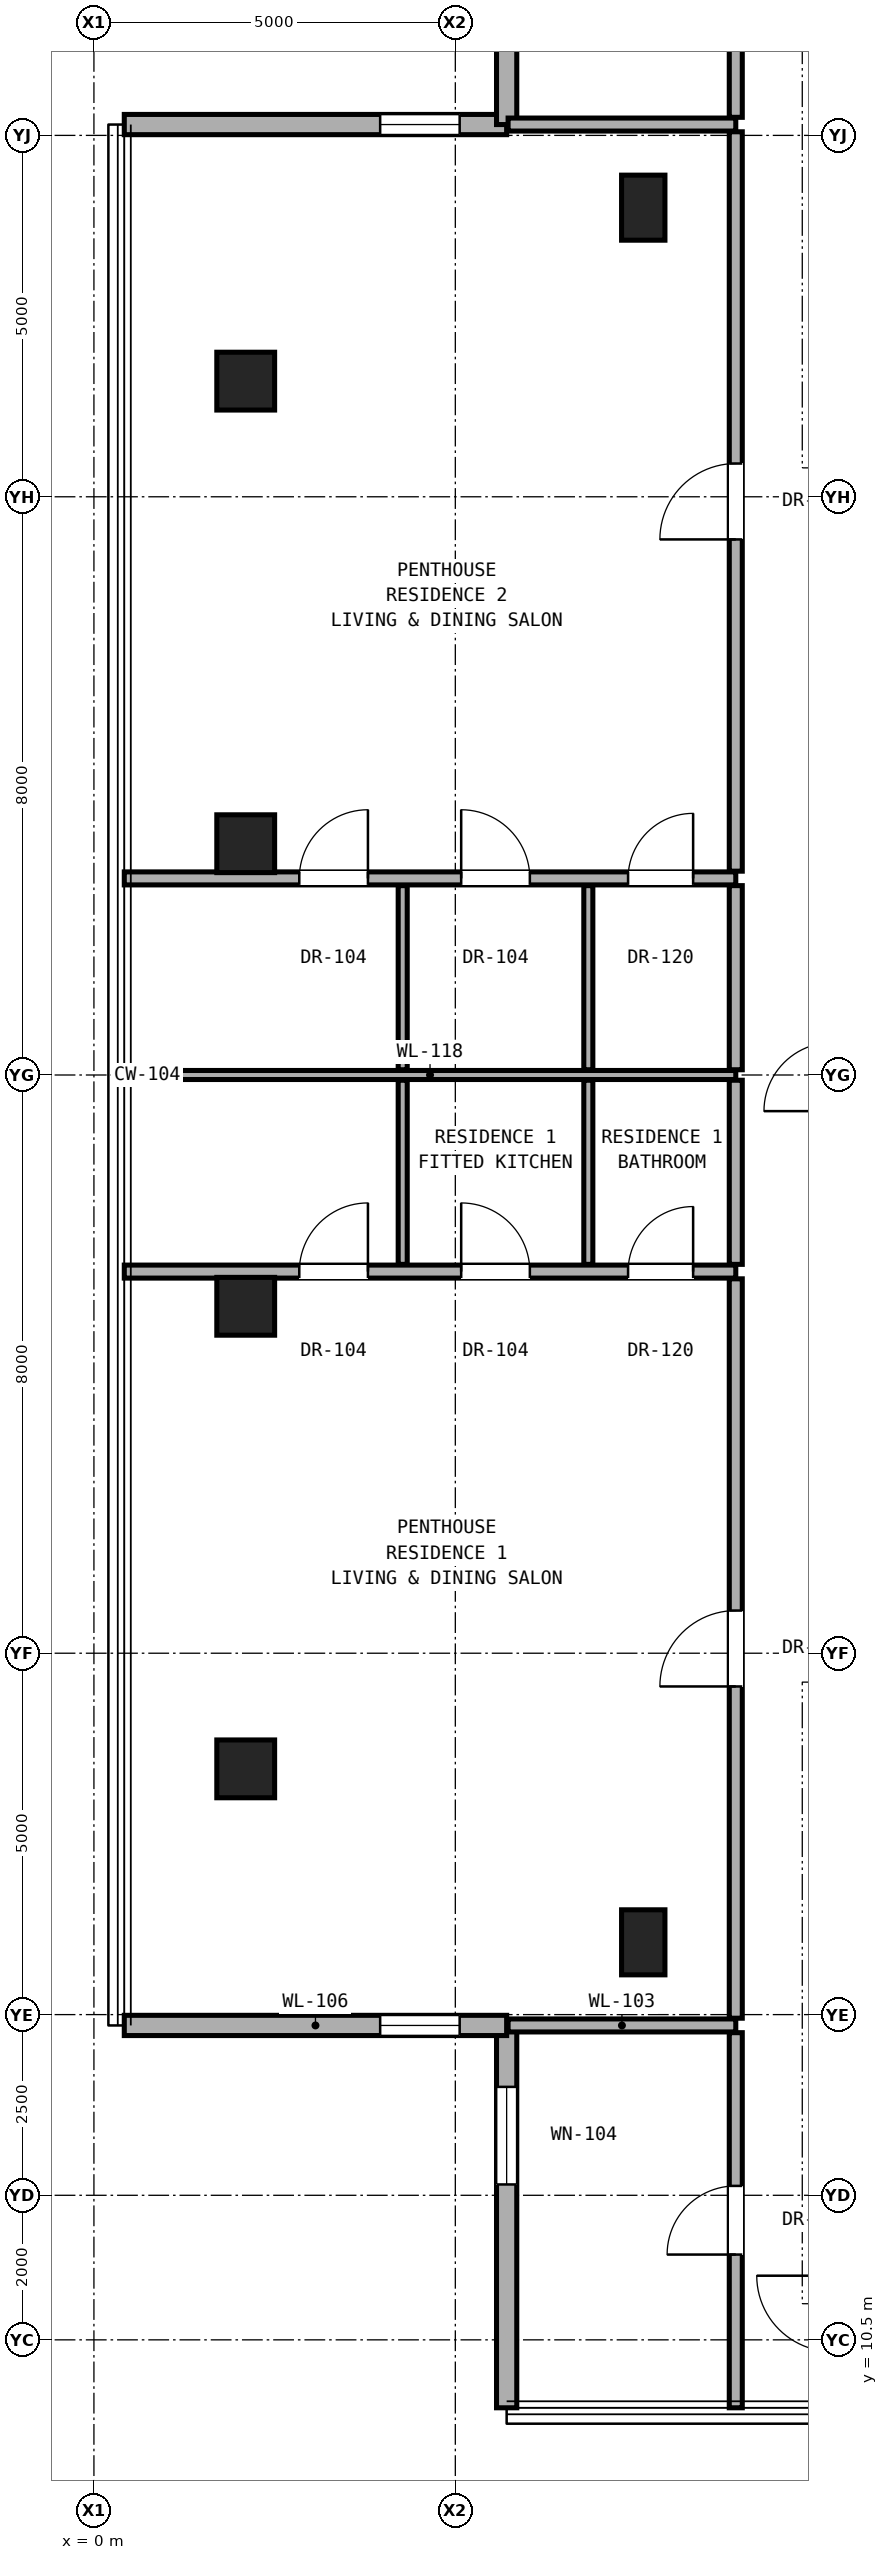
"""IFC4 building model, lengths in metres.
Left out: names, types, materials, properties, quantities, classifications, styles, units other than length and angle.
Written with IfcOpenShell. Run it as: python <this file> out.ifc"""

import sys

from ifc_helpers import new_model, si_unit, direction, frame, frame_2d, origin, origin_2d, place, context, subcontext, project, spatial, rectangle, hollow_rectangle, extrude, element, fill, save


model = new_model("IFC4")
c1 = context("Model", 3, precision=1e-05, world=origin(), true_north=direction((0.0, 1.0)))
c2 = subcontext(c1, "Body", "Model", "MODEL_VIEW")
j1 = project(units=[si_unit("LENGTHUNIT", "METRE"), si_unit("PLANEANGLEUNIT", "RADIAN")], contexts=[c1])
p1 = place(None, origin())
s1 = spatial("IfcSite", under=j1, at=p1, CompositionType="ELEMENT")
p2 = place(p1, origin())
s2 = spatial("IfcBuilding", under=s1, at=p2, CompositionType="ELEMENT")
p3 = place(p2, frame((0.0, 0.0, 219.4)))
s3 = spatial("IfcBuildingStorey", under=s2, at=p3, CompositionType="ELEMENT", Elevation=219.4)
for number, where, z_axis, x_axis in (
    (1, (2.1, 18.4, 0.0), (0.0, 0.0, 1.0), (1.0, 0.0, 0.0)),
    (2, (2.1, 24.8, 0.0), (0.0, 0.0, 1.0), (1.0, 0.0, 0.0)),
    (3, (2.1, 31.2, 0.0), (0.0, 0.0, 1.0), (1.0, 0.0, 0.0)),
    (4, (2.1, 37.6, 0.0), (0.0, 0.0, 1.0), (1.0, 0.0, 0.0)),
):
    element("IfcColumn", number, at=place(p3, frame(where, z_axis=z_axis, x_axis=x_axis)), inside=s3, PredefinedType="COLUMN", context=c2, shape_type="SweptSolid", body=[
        extrude(hollow_rectangle(XDim=0.8, YDim=0.8, WallThickness=0.045, at=origin_2d()), origin(), (0.0, 0.0, 1.0), 3.3),
    ])
for number, where, z_axis, x_axis in (
    (5, (7.6, 16.0, 0.0), (0.0, 0.0, 1.0), (1.0, 0.0, 0.0)),
    (6, (7.6, 40.0, 0.0), (0.0, 0.0, 1.0), (1.0, 0.0, 0.0)),
):
    element("IfcColumn", number, at=place(p3, frame(where, z_axis=z_axis, x_axis=x_axis)), inside=s3, PredefinedType="PILASTER", context=c2, shape_type="SweptSolid", body=[
        extrude(rectangle(XDim=0.6, YDim=0.9, at=origin_2d()), origin(), (0.0, 0.0, 1.0), 3.3),
    ])
p4 = place(p3, frame((5.71, 14.85, 0.0), z_axis=(0.0, 0.0, 1.0), x_axis=(0.0, -1.0, 0.0)))
e7 = element("IfcWall", 7, at=p4, inside=s3, PredefinedType="SOLIDWALL", context=c2, shape_type="SweptSolid", body=[
    extrude(rectangle(XDim=5.29, YDim=0.28, at=frame_2d((2.645, 0.0))), origin(), (0.0, 0.0, 1.0), 3.08),
])
p5 = place(p4, frame((0.85, 0.0, 0.73)))
e8 = element("IfcOpeningElement", 8, at=p5, cuts=e7, PredefinedType="OPENING", context=c2, shape_type="SweptSolid", body=[
    extrude(rectangle(XDim=1.35, YDim=2.2, at=frame_2d((0.675, 1.1))), frame((0.0, 0.15, 0.0), z_axis=(0.0, -1.0, 0.0), x_axis=(1.0, 0.0, 0.0)), (0.0, 0.0, 1.0), 0.3),
])
p6 = place(p3, frame((0.42, 14.85, 0.0), z_axis=(0.0, 0.0, 1.0), x_axis=(1.0, 0.0, 0.0)))
e9 = element("IfcWall", 9, at=p6, inside=s3, PredefinedType="SOLIDWALL", context=c2, shape_type="SweptSolid", body=[
    extrude(rectangle(XDim=5.29, YDim=0.28, at=frame_2d((2.645, 0.0))), origin(), (0.0, 0.0, 1.0), 3.08),
])
p7 = place(p6, frame((3.54, 0.0, 0.85)))
e10 = element("IfcOpeningElement", 10, at=p7, cuts=e9, PredefinedType="OPENING", context=c2, shape_type="SweptSolid", body=[
    extrude(rectangle(XDim=1.1, YDim=2.0, at=frame_2d((0.55, 1.0))), frame((0.0, 0.15, 0.0), z_axis=(0.0, -1.0, 0.0), x_axis=(1.0, 0.0, 0.0)), (0.0, 0.0, 1.0), 0.3),
])
p8 = place(p3, frame((5.71, 41.15, 0.0), z_axis=(0.0, 0.0, 1.0), x_axis=(-1.0, 0.0, 0.0)))
e11 = element("IfcWall", 11, at=p8, inside=s3, PredefinedType="SOLIDWALL", context=c2, shape_type="SweptSolid", body=[
    extrude(rectangle(XDim=5.29, YDim=0.28, at=frame_2d((2.645, 0.0))), origin(), (0.0, 0.0, 1.0), 3.08),
])
p9 = place(p8, frame((0.65, 0.0, 0.85)))
e12 = element("IfcOpeningElement", 12, at=p9, cuts=e11, PredefinedType="OPENING", context=c2, shape_type="SweptSolid", body=[
    extrude(rectangle(XDim=1.1, YDim=2.0, at=frame_2d((0.55, 1.0))), frame((0.0, 0.15, 0.0), z_axis=(0.0, -1.0, 0.0), x_axis=(1.0, 0.0, 0.0)), (0.0, 0.0, 1.0), 0.3),
])
p10 = place(p3, frame((5.71, 46.44, 0.0), z_axis=(0.0, 0.0, 1.0), x_axis=(0.0, -1.0, 0.0)))
e13 = element("IfcWall", 13, at=p10, inside=s3, PredefinedType="SOLIDWALL", context=c2, shape_type="SweptSolid", body=[
    extrude(rectangle(XDim=5.29, YDim=0.28, at=frame_2d((2.645, 0.0))), origin(), (0.0, 0.0, 1.0), 3.08),
])
p11 = place(p3, frame((5.73, 14.85, 0.0), z_axis=(0.0, 0.0, 1.0), x_axis=(1.0, 0.0, 0.0)))
e14 = element("IfcWall", 14, at=p11, inside=s3, PredefinedType="PARTITIONING", context=c2, shape_type="SweptSolid", body=[
    extrude(rectangle(XDim=3.15, YDim=0.18, at=frame_2d((1.575, 0.0))), origin(), (0.0, 0.0, 1.0), 3.1),
])
p12 = place(p3, frame((0.42, 25.28, 0.0), z_axis=(0.0, 0.0, 1.0), x_axis=(1.0, 0.0, 0.0)))
e15 = element("IfcWall", 15, at=p12, inside=s3, PredefinedType="PARTITIONING", context=c2, shape_type="SweptSolid", body=[
    extrude(rectangle(XDim=8.46, YDim=0.18, at=frame_2d((4.23, 0.0))), origin(), (0.0, 0.0, 1.0), 2.319),
])
p13 = place(p12, frame((2.421, 0.0, 0.0)))
e16 = element("IfcOpeningElement", 16, at=p13, cuts=e15, PredefinedType="OPENING", context=c2, shape_type="SweptSolid", body=[
    extrude(rectangle(XDim=0.95, YDim=2.15, at=frame_2d((0.475, 1.075))), frame((0.0, 0.1, 0.0), z_axis=(0.0, -1.0, 0.0), x_axis=(1.0, 0.0, 0.0)), (0.0, 0.0, 1.0), 0.2),
])
p14 = place(p12, frame((4.661, 0.0, 0.0)))
e17 = element("IfcOpeningElement", 17, at=p14, cuts=e15, PredefinedType="OPENING", context=c2, shape_type="SweptSolid", body=[
    extrude(rectangle(XDim=0.95, YDim=2.15, at=frame_2d((0.475, 1.075))), frame((0.0, 0.1, 0.0), z_axis=(0.0, -1.0, 0.0), x_axis=(1.0, 0.0, 0.0)), (0.0, 0.0, 1.0), 0.2),
])
p15 = place(p12, frame((6.97, 0.0, 0.0)))
e18 = element("IfcOpeningElement", 18, at=p15, cuts=e15, PredefinedType="OPENING", context=c2, shape_type="SweptSolid", body=[
    extrude(rectangle(XDim=0.9, YDim=2.1, at=frame_2d((0.45, 1.05))), frame((0.0, 0.1, 0.0), z_axis=(0.0, -1.0, 0.0), x_axis=(1.0, 0.0, 0.0)), (0.0, 0.0, 1.0), 0.2),
])
p16 = place(p3, frame((0.42, 28.0, 0.0), z_axis=(0.0, 0.0, 1.0), x_axis=(1.0, 0.0, 0.0)))
e19 = element("IfcWall", 19, at=p16, inside=s3, PredefinedType="PARTITIONING", context=c2, shape_type="SweptSolid", body=[
    extrude(rectangle(XDim=8.46, YDim=0.125, at=frame_2d((4.23, 0.0))), origin(), (0.0, 0.0, 1.0), 2.319),
])
p17 = place(p3, frame((0.42, 30.72, 0.0), z_axis=(0.0, 0.0, 1.0), x_axis=(1.0, 0.0, 0.0)))
e20 = element("IfcWall", 20, at=p17, inside=s3, PredefinedType="PARTITIONING", context=c2, shape_type="SweptSolid", body=[
    extrude(rectangle(XDim=8.46, YDim=0.18, at=frame_2d((4.23, 0.0))), origin(), (0.0, 0.0, 1.0), 2.319),
])
p18 = place(p17, frame((2.421, 0.0, 0.0)))
e21 = element("IfcOpeningElement", 21, at=p18, cuts=e20, PredefinedType="OPENING", context=c2, shape_type="SweptSolid", body=[
    extrude(rectangle(XDim=0.95, YDim=2.15, at=frame_2d((0.475, 1.075))), frame((0.0, 0.1, 0.0), z_axis=(0.0, -1.0, 0.0), x_axis=(1.0, 0.0, 0.0)), (0.0, 0.0, 1.0), 0.2),
])
p19 = place(p17, frame((4.661, 0.0, 0.0)))
e22 = element("IfcOpeningElement", 22, at=p19, cuts=e20, PredefinedType="OPENING", context=c2, shape_type="SweptSolid", body=[
    extrude(rectangle(XDim=0.95, YDim=2.15, at=frame_2d((0.475, 1.075))), frame((0.0, 0.1, 0.0), z_axis=(0.0, -1.0, 0.0), x_axis=(1.0, 0.0, 0.0)), (0.0, 0.0, 1.0), 0.2),
])
p20 = place(p17, frame((6.97, 0.0, 0.0)))
e23 = element("IfcOpeningElement", 23, at=p20, cuts=e20, PredefinedType="OPENING", context=c2, shape_type="SweptSolid", body=[
    extrude(rectangle(XDim=0.9, YDim=2.1, at=frame_2d((0.45, 1.05))), frame((0.0, 0.1, 0.0), z_axis=(0.0, -1.0, 0.0), x_axis=(1.0, 0.0, 0.0)), (0.0, 0.0, 1.0), 0.2),
])
p21 = place(p3, frame((5.73, 41.15, 0.0), z_axis=(0.0, 0.0, 1.0), x_axis=(1.0, 0.0, 0.0)))
e24 = element("IfcWall", 24, at=p21, inside=s3, PredefinedType="PARTITIONING", context=c2, shape_type="SweptSolid", body=[
    extrude(rectangle(XDim=3.15, YDim=0.18, at=frame_2d((1.575, 0.0))), origin(), (0.0, 0.0, 1.0), 3.1),
])
for number, where, z_axis, x_axis in (
    (25, (4.272, 25.38, 0.0), (0.0, 0.0, 1.0), (0.0, 1.0, 0.0)),
    (26, (4.272, 28.073, 0.0), (0.0, 0.0, 1.0), (0.0, 1.0, 0.0)),
    (27, (6.84, 25.38, 0.0), (0.0, 0.0, 1.0), (0.0, 1.0, 0.0)),
    (28, (6.84, 28.073, 0.0), (0.0, 0.0, 1.0), (0.0, 1.0, 0.0)),
):
    element("IfcWall", number, at=place(p3, frame(where, z_axis=z_axis, x_axis=x_axis)), inside=s3, PredefinedType="PARTITIONING", context=c2, shape_type="SweptSolid", body=[
        extrude(rectangle(XDim=2.548, YDim=0.125, at=frame_2d((1.274, 0.0))), origin(), (0.0, 0.0, 1.0), 3.1),
    ])
p22 = place(p3, frame((8.88, 9.56, 0.0), z_axis=(0.0, 0.0, 1.0), x_axis=(0.0, 1.0, 0.0)))
e29 = element("IfcWall", 29, at=p22, inside=s3, PredefinedType="PARTITIONING", context=c2, shape_type="SweptSolid", body=[
    extrude(rectangle(XDim=5.19, YDim=0.18, at=frame_2d((2.595, 0.0))), origin(), (0.0, 0.0, 1.0), 3.1),
])
p23 = place(p22, frame((2.12, 0.0, 0.0)))
e30 = element("IfcOpeningElement", 30, at=p23, cuts=e29, PredefinedType="OPENING", context=c2, shape_type="SweptSolid", body=[
    extrude(rectangle(XDim=0.95, YDim=2.15, at=frame_2d((0.475, 1.075))), frame((0.0, 0.1, 0.0), z_axis=(0.0, -1.0, 0.0), x_axis=(1.0, 0.0, 0.0)), (0.0, 0.0, 1.0), 0.2),
])
p24 = place(p3, frame((8.88, 14.95, 0.0), z_axis=(0.0, 0.0, 1.0), x_axis=(0.0, 1.0, 0.0)))
e31 = element("IfcWall", 31, at=p24, inside=s3, PredefinedType="PARTITIONING", context=c2, shape_type="SweptSolid", body=[
    extrude(rectangle(XDim=10.23, YDim=0.18, at=frame_2d((5.115, 0.0))), origin(), (0.0, 0.0, 1.0), 2.396),
])
p25 = place(p24, frame((4.59, 0.0, 0.0)))
e32 = element("IfcOpeningElement", 32, at=p25, cuts=e31, PredefinedType="OPENING", context=c2, shape_type="SweptSolid", body=[
    extrude(rectangle(XDim=1.05, YDim=2.2, at=frame_2d((0.525, 1.1))), frame((0.0, 0.1, 0.0), z_axis=(0.0, -1.0, 0.0), x_axis=(1.0, 0.0, 0.0)), (0.0, 0.0, 1.0), 0.2),
])
for number, where, z_axis, x_axis in (
    (33, (8.88, 25.38, 0.0), (0.0, 0.0, 1.0), (0.0, 1.0, 0.0)),
    (34, (8.88, 28.073, 0.0), (0.0, 0.0, 1.0), (0.0, 1.0, 0.0)),
):
    element("IfcWall", number, at=place(p3, frame(where, z_axis=z_axis, x_axis=x_axis)), inside=s3, PredefinedType="PARTITIONING", context=c2, shape_type="SweptSolid", body=[
        extrude(rectangle(XDim=2.548, YDim=0.18, at=frame_2d((1.274, 0.0))), origin(), (0.0, 0.0, 1.0), 3.1),
    ])
p26 = place(p3, frame((8.88, 30.82, 0.0), z_axis=(0.0, 0.0, 1.0), x_axis=(0.0, 1.0, 0.0)))
e35 = element("IfcWall", 35, at=p26, inside=s3, PredefinedType="PARTITIONING", context=c2, shape_type="SweptSolid", body=[
    extrude(rectangle(XDim=10.23, YDim=0.18, at=frame_2d((5.115, 0.0))), origin(), (0.0, 0.0, 1.0), 2.396),
])
p27 = place(p26, frame((4.59, 0.0, 0.0)))
e36 = element("IfcOpeningElement", 36, at=p27, cuts=e35, PredefinedType="OPENING", context=c2, shape_type="SweptSolid", body=[
    extrude(rectangle(XDim=1.05, YDim=2.2, at=frame_2d((0.525, 1.1))), frame((0.0, 0.1, 0.0), z_axis=(0.0, -1.0, 0.0), x_axis=(1.0, 0.0, 0.0)), (0.0, 0.0, 1.0), 0.2),
])
p28 = place(p3, frame((8.88, 41.25, 0.0), z_axis=(0.0, 0.0, 1.0), x_axis=(0.0, 1.0, 0.0)))
e37 = element("IfcWall", 37, at=p28, inside=s3, PredefinedType="PARTITIONING", context=c2, shape_type="SweptSolid", body=[
    extrude(rectangle(XDim=5.19, YDim=0.18, at=frame_2d((2.595, 0.0))), origin(), (0.0, 0.0, 1.0), 3.1),
])
p29 = place(p28, frame((2.12, 0.0, 0.0)))
e38 = element("IfcOpeningElement", 38, at=p29, cuts=e37, PredefinedType="OPENING", context=c2, shape_type="SweptSolid", body=[
    extrude(rectangle(XDim=0.95, YDim=2.15, at=frame_2d((0.475, 1.075))), frame((0.0, 0.1, 0.0), z_axis=(0.0, -1.0, 0.0), x_axis=(1.0, 0.0, 0.0)), (0.0, 0.0, 1.0), 0.2),
])
p30 = place(p5, origin())
e39 = element("IfcWindow", 39, at=p30, inside=s3, PartitioningType="SINGLE_PANEL", PredefinedType="WINDOW", context=c2, shape_type="SweptSolid", body=[
    extrude(rectangle(XDim=1.35, YDim=2.2, at=frame_2d((0.675, 1.1))), frame((0.0, 0.03, 0.0), z_axis=(0.0, -1.0, 0.0), x_axis=(1.0, 0.0, 0.0)), (0.0, 0.0, 1.0), 0.06),
])
fill(e8, e39)
p31 = place(p7, origin())
e40 = element("IfcWindow", 40, at=p31, inside=s3, PartitioningType="SINGLE_PANEL", PredefinedType="WINDOW", context=c2, shape_type="SweptSolid", body=[
    extrude(rectangle(XDim=1.1, YDim=2.0, at=frame_2d((0.55, 1.0))), frame((0.0, 0.03, 0.0), z_axis=(0.0, -1.0, 0.0), x_axis=(1.0, 0.0, 0.0)), (0.0, 0.0, 1.0), 0.06),
])
fill(e10, e40)
p32 = place(p9, origin())
e41 = element("IfcWindow", 41, at=p32, inside=s3, PartitioningType="SINGLE_PANEL", PredefinedType="WINDOW", context=c2, shape_type="SweptSolid", body=[
    extrude(rectangle(XDim=1.1, YDim=2.0, at=frame_2d((0.55, 1.0))), frame((0.0, 0.03, 0.0), z_axis=(0.0, -1.0, 0.0), x_axis=(1.0, 0.0, 0.0)), (0.0, 0.0, 1.0), 0.06),
])
fill(e12, e41)
p33 = place(p25, origin())
e42 = element("IfcDoor", 42, at=p33, inside=s3, OperationType="SINGLE_SWING_LEFT", PredefinedType="DOOR", context=c2, shape_type="SweptSolid", body=[
    extrude(rectangle(XDim=1.05, YDim=2.2, at=frame_2d((0.525, 1.1))), frame((0.0, 0.025, 0.0), z_axis=(0.0, -1.0, 0.0), x_axis=(1.0, 0.0, 0.0)), (0.0, 0.0, 1.0), 0.05),
])
fill(e32, e42)
p34 = place(p13, origin())
e43 = element("IfcDoor", 43, at=p34, inside=s3, OperationType="SINGLE_SWING_RIGHT", PredefinedType="DOOR", context=c2, shape_type="SweptSolid", body=[
    extrude(rectangle(XDim=0.95, YDim=2.15, at=frame_2d((0.475, 1.075))), frame((0.0, 0.025, 0.0), z_axis=(0.0, -1.0, 0.0), x_axis=(1.0, 0.0, 0.0)), (0.0, 0.0, 1.0), 0.05),
])
fill(e16, e43)
p35 = place(p14, origin())
e44 = element("IfcDoor", 44, at=p35, inside=s3, OperationType="SINGLE_SWING_LEFT", PredefinedType="DOOR", context=c2, shape_type="SweptSolid", body=[
    extrude(rectangle(XDim=0.95, YDim=2.15, at=frame_2d((0.475, 1.075))), frame((0.0, 0.025, 0.0), z_axis=(0.0, -1.0, 0.0), x_axis=(1.0, 0.0, 0.0)), (0.0, 0.0, 1.0), 0.05),
])
fill(e17, e44)
p36 = place(p15, origin())
e45 = element("IfcDoor", 45, at=p36, inside=s3, OperationType="SINGLE_SWING_RIGHT", PredefinedType="DOOR", context=c2, shape_type="SweptSolid", body=[
    extrude(rectangle(XDim=0.9, YDim=2.1, at=frame_2d((0.45, 1.05))), frame((0.0, 0.025, 0.0), z_axis=(0.0, -1.0, 0.0), x_axis=(1.0, 0.0, 0.0)), (0.0, 0.0, 1.0), 0.05),
])
fill(e18, e45)
p37 = place(p27, origin())
e46 = element("IfcDoor", 46, at=p37, inside=s3, OperationType="SINGLE_SWING_LEFT", PredefinedType="DOOR", context=c2, shape_type="SweptSolid", body=[
    extrude(rectangle(XDim=1.05, YDim=2.2, at=frame_2d((0.525, 1.1))), frame((0.0, 0.025, 0.0), z_axis=(0.0, -1.0, 0.0), x_axis=(1.0, 0.0, 0.0)), (0.0, 0.0, 1.0), 0.05),
])
fill(e36, e46)
p38 = place(p18, origin())
e47 = element("IfcDoor", 47, at=p38, inside=s3, OperationType="SINGLE_SWING_RIGHT", PredefinedType="DOOR", context=c2, shape_type="SweptSolid", body=[
    extrude(rectangle(XDim=0.95, YDim=2.15, at=frame_2d((0.475, 1.075))), frame((0.0, 0.025, 0.0), z_axis=(0.0, -1.0, 0.0), x_axis=(1.0, 0.0, 0.0)), (0.0, 0.0, 1.0), 0.05),
])
fill(e21, e47)
p39 = place(p19, origin())
e48 = element("IfcDoor", 48, at=p39, inside=s3, OperationType="SINGLE_SWING_LEFT", PredefinedType="DOOR", context=c2, shape_type="SweptSolid", body=[
    extrude(rectangle(XDim=0.95, YDim=2.15, at=frame_2d((0.475, 1.075))), frame((0.0, 0.025, 0.0), z_axis=(0.0, -1.0, 0.0), x_axis=(1.0, 0.0, 0.0)), (0.0, 0.0, 1.0), 0.05),
])
fill(e22, e48)
p40 = place(p20, origin())
e49 = element("IfcDoor", 49, at=p40, inside=s3, OperationType="SINGLE_SWING_RIGHT", PredefinedType="DOOR", context=c2, shape_type="SweptSolid", body=[
    extrude(rectangle(XDim=0.9, YDim=2.1, at=frame_2d((0.45, 1.05))), frame((0.0, 0.025, 0.0), z_axis=(0.0, -1.0, 0.0), x_axis=(1.0, 0.0, 0.0)), (0.0, 0.0, 1.0), 0.05),
])
fill(e23, e49)
p41 = place(p23, origin())
e50 = element("IfcDoor", 50, at=p41, inside=s3, OperationType="SINGLE_SWING_LEFT", PredefinedType="DOOR", context=c2, shape_type="SweptSolid", body=[
    extrude(rectangle(XDim=0.95, YDim=2.15, at=frame_2d((0.475, 1.075))), frame((0.0, 0.025, 0.0), z_axis=(0.0, -1.0, 0.0), x_axis=(1.0, 0.0, 0.0)), (0.0, 0.0, 1.0), 0.05),
])
fill(e30, e50)
save(model, sys.argv[1])
